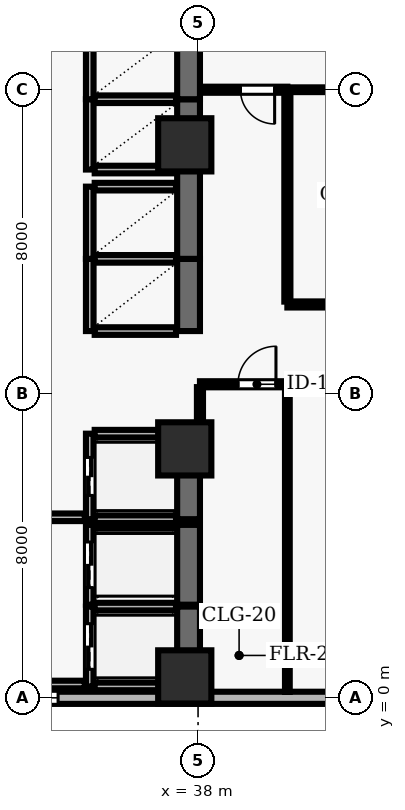
"""IFC4 building model, lengths in metres.
Left out: names, types, materials, properties, quantities, classifications, styles, units other than length and angle.
Written with IfcOpenShell. Run it as: python <this file> out.ifc"""

import sys

from ifc_helpers import new_model, si_unit, direction, frame, frame_2d, origin, origin_2d, place, context, subcontext, project, spatial, rectangle, extrude, element, fill, save


model = new_model("IFC4")
c1 = context("Model", 3, precision=1e-05, world=origin(), true_north=direction((0.0, 1.0)))
c2 = subcontext(c1, "Body", "Model", "MODEL_VIEW")
j1 = project(units=[si_unit("LENGTHUNIT", "METRE"), si_unit("PLANEANGLEUNIT", "RADIAN")], contexts=[c1])
p1 = place(None, origin())
s1 = spatial("IfcSite", under=j1, at=p1, CompositionType="ELEMENT")
p2 = place(p1, origin())
s2 = spatial("IfcBuilding", under=s1, at=p2, CompositionType="ELEMENT")
p3 = place(p2, frame((0.0, 0.0, 26.0)))
s3 = spatial("IfcBuildingStorey", under=s2, at=p3, CompositionType="ELEMENT", Elevation=26.0)
for number, where, z_axis, x_axis in (
    (1, (37.65, 0.55, 0.0), (0.0, 0.0, 1.0), (1.0, 0.0, 0.0)),
    (2, (37.65, 6.55, 0.0), (0.0, 0.0, 1.0), (1.0, 0.0, 0.0)),
    (3, (37.65, 14.55, 0.0), (0.0, 0.0, 1.0), (1.0, 0.0, 0.0)),
):
    element("IfcColumn", number, at=place(p3, frame(where, z_axis=z_axis, x_axis=x_axis)), inside=s3, PredefinedType="COLUMN", context=c2, shape_type="SweptSolid", body=[
        extrude(rectangle(XDim=1.4, YDim=1.4, at=origin_2d()), origin(), (0.0, 0.0, 1.0), 5.0),
    ])
p4 = place(p3, frame((24.5, 0.0, 0.0), z_axis=(0.0, 0.0, 1.0), x_axis=(1.0, 0.0, 0.0)))
e4 = element("IfcWall", 4, at=p4, inside=s3, PredefinedType="SOLIDWALL", context=c2, shape_type="SweptSolid", body=[
    extrude(rectangle(XDim=49.0, YDim=0.32, at=frame_2d((24.5, 0.0))), origin(), (0.0, 0.0, 1.0), 4.79),
])
p5 = place(p4, frame((1.972, 0.0, 0.9)))
e5 = element("IfcOpeningElement", 5, at=p5, cuts=e4, PredefinedType="OPENING", context=c2, shape_type="SweptSolid", body=[
    extrude(rectangle(XDim=1.5, YDim=1.8, at=frame_2d((0.75, 0.9))), frame((0.0, 0.17, 0.0), z_axis=(0.0, -1.0, 0.0), x_axis=(1.0, 0.0, 0.0)), (0.0, 0.0, 1.0), 0.34),
])
p6 = place(p4, frame((8.317, 0.0, 0.9)))
e6 = element("IfcOpeningElement", 6, at=p6, cuts=e4, PredefinedType="OPENING", context=c2, shape_type="SweptSolid", body=[
    extrude(rectangle(XDim=1.5, YDim=1.8, at=frame_2d((0.75, 0.9))), frame((0.0, 0.17, 0.0), z_axis=(0.0, -1.0, 0.0), x_axis=(1.0, 0.0, 0.0)), (0.0, 0.0, 1.0), 0.34),
])
p7 = place(p4, frame((18.306, 0.0, 0.9)))
e7 = element("IfcOpeningElement", 7, at=p7, cuts=e4, PredefinedType="OPENING", context=c2, shape_type="SweptSolid", body=[
    extrude(rectangle(XDim=1.5, YDim=1.8, at=frame_2d((0.75, 0.9))), frame((0.0, 0.17, 0.0), z_axis=(0.0, -1.0, 0.0), x_axis=(1.0, 0.0, 0.0)), (0.0, 0.0, 1.0), 0.34),
])
p8 = place(p4, frame((29.194, 0.0, 0.9)))
e8 = element("IfcOpeningElement", 8, at=p8, cuts=e4, PredefinedType="OPENING", context=c2, shape_type="SweptSolid", body=[
    extrude(rectangle(XDim=1.5, YDim=1.8, at=frame_2d((0.75, 0.9))), frame((0.0, 0.17, 0.0), z_axis=(0.0, -1.0, 0.0), x_axis=(1.0, 0.0, 0.0)), (0.0, 0.0, 1.0), 0.34),
])
p9 = place(p4, frame((34.639, 0.0, 0.9)))
e9 = element("IfcOpeningElement", 9, at=p9, cuts=e4, PredefinedType="OPENING", context=c2, shape_type="SweptSolid", body=[
    extrude(rectangle(XDim=1.5, YDim=1.8, at=frame_2d((0.75, 0.9))), frame((0.0, 0.17, 0.0), z_axis=(0.0, -1.0, 0.0), x_axis=(1.0, 0.0, 0.0)), (0.0, 0.0, 1.0), 0.34),
])
p10 = place(p4, frame((40.083, 0.0, 0.9)))
e10 = element("IfcOpeningElement", 10, at=p10, cuts=e4, PredefinedType="OPENING", context=c2, shape_type="SweptSolid", body=[
    extrude(rectangle(XDim=1.5, YDim=1.8, at=frame_2d((0.75, 0.9))), frame((0.0, 0.17, 0.0), z_axis=(0.0, -1.0, 0.0), x_axis=(1.0, 0.0, 0.0)), (0.0, 0.0, 1.0), 0.34),
])
p11 = place(p4, frame((45.528, 0.0, 0.9)))
e11 = element("IfcOpeningElement", 11, at=p11, cuts=e4, PredefinedType="OPENING", context=c2, shape_type="SweptSolid", body=[
    extrude(rectangle(XDim=1.5, YDim=1.8, at=frame_2d((0.75, 0.9))), frame((0.0, 0.17, 0.0), z_axis=(0.0, -1.0, 0.0), x_axis=(1.0, 0.0, 0.0)), (0.0, 0.0, 1.0), 0.34),
])
p12 = place(p3, frame((35.15, 2.4, 0.0), z_axis=(0.0, 0.0, 1.0), x_axis=(0.0, -1.0, 0.0)))
e12 = element("IfcWall", 12, at=p12, inside=s3, PredefinedType="SOLIDWALL", context=c2, shape_type="SweptSolid", body=[
    extrude(rectangle(XDim=2.1, YDim=0.2, at=frame_2d((1.05, 0.0))), origin(), (0.0, 0.0, 1.0), 4.79),
])
p13 = place(p12, frame((0.45, 0.0, 0.0)))
e13 = element("IfcOpeningElement", 13, at=p13, cuts=e12, PredefinedType="OPENING", context=c2, shape_type="SweptSolid", body=[
    extrude(rectangle(XDim=1.2, YDim=2.15, at=frame_2d((0.6, 1.075))), frame((0.0, 0.11, 0.0), z_axis=(0.0, -1.0, 0.0), x_axis=(1.0, 0.0, 0.0)), (0.0, 0.0, 1.0), 0.22),
])
p14 = place(p3, frame((37.75, 0.3, 0.0), z_axis=(0.0, 0.0, 1.0), x_axis=(0.0, 1.0, 0.0)))
e14 = element("IfcWall", 14, at=p14, inside=s3, PredefinedType="SHEAR", context=c2, shape_type="SweptSolid", body=[
    extrude(rectangle(XDim=2.1, YDim=0.6, at=frame_2d((1.05, 0.0))), origin(), (0.0, 0.0, 1.0), 4.79),
])
for number, where, z_axis, x_axis in (
    (15, (35.28, 0.3, 0.0), (0.0, 0.0, 1.0), (1.0, 0.0, 0.0)),
    (16, (37.42, 2.4, 0.0), (0.0, 0.0, 1.0), (-1.0, 0.0, 0.0)),
):
    element("IfcWall", number, at=place(p3, frame(where, z_axis=z_axis, x_axis=x_axis)), inside=s3, PredefinedType="SOLIDWALL", context=c2, shape_type="SweptSolid", body=[
        extrude(rectangle(XDim=2.14, YDim=0.2, at=frame_2d((1.07, 0.0))), origin(), (0.0, 0.0, 1.0), 4.79),
    ])
p15 = place(p3, frame((35.15, 4.55, 0.0), z_axis=(0.0, 0.0, 1.0), x_axis=(0.0, -1.0, 0.0)))
e17 = element("IfcWall", 17, at=p15, inside=s3, PredefinedType="SOLIDWALL", context=c2, shape_type="SweptSolid", body=[
    extrude(rectangle(XDim=2.1, YDim=0.2, at=frame_2d((1.05, 0.0))), origin(), (0.0, 0.0, 1.0), 4.79),
])
p16 = place(p15, frame((0.45, 0.0, 0.0)))
e18 = element("IfcOpeningElement", 18, at=p16, cuts=e17, PredefinedType="OPENING", context=c2, shape_type="SweptSolid", body=[
    extrude(rectangle(XDim=1.2, YDim=2.15, at=frame_2d((0.6, 1.075))), frame((0.0, 0.11, 0.0), z_axis=(0.0, -1.0, 0.0), x_axis=(1.0, 0.0, 0.0)), (0.0, 0.0, 1.0), 0.22),
])
p17 = place(p3, frame((37.75, 2.45, 0.0), z_axis=(0.0, 0.0, 1.0), x_axis=(0.0, 1.0, 0.0)))
e19 = element("IfcWall", 19, at=p17, inside=s3, PredefinedType="SHEAR", context=c2, shape_type="SweptSolid", body=[
    extrude(rectangle(XDim=2.1, YDim=0.6, at=frame_2d((1.05, 0.0))), origin(), (0.0, 0.0, 1.0), 4.79),
])
p18 = place(p3, frame((37.42, 4.55, 0.0), z_axis=(0.0, 0.0, 1.0), x_axis=(-1.0, 0.0, 0.0)))
e20 = element("IfcWall", 20, at=p18, inside=s3, PredefinedType="SOLIDWALL", context=c2, shape_type="SweptSolid", body=[
    extrude(rectangle(XDim=2.14, YDim=0.2, at=frame_2d((1.07, 0.0))), origin(), (0.0, 0.0, 1.0), 4.79),
])
p19 = place(p3, frame((35.15, 6.95, 0.0), z_axis=(0.0, 0.0, 1.0), x_axis=(0.0, -1.0, 0.0)))
e21 = element("IfcWall", 21, at=p19, inside=s3, PredefinedType="SOLIDWALL", context=c2, shape_type="SweptSolid", body=[
    extrude(rectangle(XDim=2.25, YDim=0.2, at=frame_2d((1.125, 0.0))), origin(), (0.0, 0.0, 1.0), 4.79),
])
p20 = place(p19, frame((0.625, 0.0, 0.0)))
e22 = element("IfcOpeningElement", 22, at=p20, cuts=e21, PredefinedType="OPENING", context=c2, shape_type="SweptSolid", body=[
    extrude(rectangle(XDim=1.0, YDim=2.1, at=frame_2d((0.5, 1.05))), frame((0.0, 0.11, 0.0), z_axis=(0.0, -1.0, 0.0), x_axis=(1.0, 0.0, 0.0)), (0.0, 0.0, 1.0), 0.22),
])
p21 = place(p3, frame((37.75, 4.7, 0.0), z_axis=(0.0, 0.0, 1.0), x_axis=(0.0, 1.0, 0.0)))
e23 = element("IfcWall", 23, at=p21, inside=s3, PredefinedType="SHEAR", context=c2, shape_type="SweptSolid", body=[
    extrude(rectangle(XDim=2.25, YDim=0.6, at=frame_2d((1.125, 0.0))), origin(), (0.0, 0.0, 1.0), 4.79),
])
for number, where, z_axis, x_axis in (
    (24, (35.28, 4.7, 0.0), (0.0, 0.0, 1.0), (1.0, 0.0, 0.0)),
    (25, (37.42, 6.95, 0.0), (0.0, 0.0, 1.0), (-1.0, 0.0, 0.0)),
):
    element("IfcWall", number, at=place(p3, frame(where, z_axis=z_axis, x_axis=x_axis)), inside=s3, PredefinedType="SOLIDWALL", context=c2, shape_type="SweptSolid", body=[
        extrude(rectangle(XDim=2.14, YDim=0.2, at=frame_2d((1.07, 0.0))), origin(), (0.0, 0.0, 1.0), 4.79),
    ])
p22 = place(p3, frame((35.15, 11.55, 0.0), z_axis=(0.0, 0.0, 1.0), x_axis=(0.0, -1.0, 0.0)))
e26 = element("IfcWall", 26, at=p22, inside=s3, PredefinedType="SOLIDWALL", context=c2, shape_type="SweptSolid", body=[
    extrude(rectangle(XDim=1.9, YDim=0.2, at=frame_2d((0.95, 0.0))), origin(), (0.0, 0.0, 1.0), 4.79),
])
p23 = place(p3, frame((37.75, 9.65, 0.0), z_axis=(0.0, 0.0, 1.0), x_axis=(0.0, 1.0, 0.0)))
e27 = element("IfcWall", 27, at=p23, inside=s3, PredefinedType="SHEAR", context=c2, shape_type="SweptSolid", body=[
    extrude(rectangle(XDim=1.9, YDim=0.6, at=frame_2d((0.95, 0.0))), origin(), (0.0, 0.0, 1.0), 4.79),
])
for number, where, z_axis, x_axis in (
    (28, (35.28, 9.65, 0.0), (0.0, 0.0, 1.0), (1.0, 0.0, 0.0)),
    (29, (37.42, 11.55, 0.0), (0.0, 0.0, 1.0), (-1.0, 0.0, 0.0)),
):
    element("IfcWall", number, at=place(p3, frame(where, z_axis=z_axis, x_axis=x_axis)), inside=s3, PredefinedType="SOLIDWALL", context=c2, shape_type="SweptSolid", body=[
        extrude(rectangle(XDim=2.14, YDim=0.2, at=frame_2d((1.07, 0.0))), origin(), (0.0, 0.0, 1.0), 4.79),
    ])
p24 = place(p3, frame((35.15, 13.45, 0.0), z_axis=(0.0, 0.0, 1.0), x_axis=(0.0, -1.0, 0.0)))
e30 = element("IfcWall", 30, at=p24, inside=s3, PredefinedType="SOLIDWALL", context=c2, shape_type="SweptSolid", body=[
    extrude(rectangle(XDim=1.9, YDim=0.2, at=frame_2d((0.95, 0.0))), origin(), (0.0, 0.0, 1.0), 4.79),
])
p25 = place(p3, frame((37.75, 11.55, 0.0), z_axis=(0.0, 0.0, 1.0), x_axis=(0.0, 1.0, 0.0)))
e31 = element("IfcWall", 31, at=p25, inside=s3, PredefinedType="SHEAR", context=c2, shape_type="SweptSolid", body=[
    extrude(rectangle(XDim=2.35, YDim=0.6, at=frame_2d((1.175, 0.0))), origin(), (0.0, 0.0, 1.0), 4.79),
])
p26 = place(p3, frame((37.42, 13.45, 0.0), z_axis=(0.0, 0.0, 1.0), x_axis=(-1.0, 0.0, 0.0)))
e32 = element("IfcWall", 32, at=p26, inside=s3, PredefinedType="SOLIDWALL", context=c2, shape_type="SweptSolid", body=[
    extrude(rectangle(XDim=2.14, YDim=0.2, at=frame_2d((1.07, 0.0))), origin(), (0.0, 0.0, 1.0), 4.79),
])
p27 = place(p3, frame((35.15, 15.75, 0.0), z_axis=(0.0, 0.0, 1.0), x_axis=(0.0, -1.0, 0.0)))
e33 = element("IfcWall", 33, at=p27, inside=s3, PredefinedType="SOLIDWALL", context=c2, shape_type="SweptSolid", body=[
    extrude(rectangle(XDim=1.85, YDim=0.2, at=frame_2d((0.925, 0.0))), origin(), (0.0, 0.0, 1.0), 4.79),
])
p28 = place(p3, frame((37.75, 13.9, 0.0), z_axis=(0.0, 0.0, 1.0), x_axis=(0.0, 1.0, 0.0)))
e34 = element("IfcWall", 34, at=p28, inside=s3, PredefinedType="SHEAR", context=c2, shape_type="SweptSolid", body=[
    extrude(rectangle(XDim=1.85, YDim=0.6, at=frame_2d((0.925, 0.0))), origin(), (0.0, 0.0, 1.0), 4.79),
])
for number, where, z_axis, x_axis in (
    (35, (35.28, 13.9, 0.0), (0.0, 0.0, 1.0), (1.0, 0.0, 0.0)),
    (36, (37.42, 15.75, 0.0), (0.0, 0.0, 1.0), (-1.0, 0.0, 0.0)),
):
    element("IfcWall", number, at=place(p3, frame(where, z_axis=z_axis, x_axis=x_axis)), inside=s3, PredefinedType="SOLIDWALL", context=c2, shape_type="SweptSolid", body=[
        extrude(rectangle(XDim=2.14, YDim=0.2, at=frame_2d((1.07, 0.0))), origin(), (0.0, 0.0, 1.0), 4.79),
    ])
p29 = place(p3, frame((35.15, 17.6, 0.0), z_axis=(0.0, 0.0, 1.0), x_axis=(0.0, -1.0, 0.0)))
e37 = element("IfcWall", 37, at=p29, inside=s3, PredefinedType="SOLIDWALL", context=c2, shape_type="SweptSolid", body=[
    extrude(rectangle(XDim=1.85, YDim=0.2, at=frame_2d((0.925, 0.0))), origin(), (0.0, 0.0, 1.0), 4.79),
])
p30 = place(p3, frame((37.75, 15.75, 0.0), z_axis=(0.0, 0.0, 1.0), x_axis=(0.0, 1.0, 0.0)))
e38 = element("IfcWall", 38, at=p30, inside=s3, PredefinedType="SHEAR", context=c2, shape_type="SweptSolid", body=[
    extrude(rectangle(XDim=1.85, YDim=0.6, at=frame_2d((0.925, 0.0))), origin(), (0.0, 0.0, 1.0), 4.79),
])
p31 = place(p3, frame((31.65, 0.35, 0.0), z_axis=(0.0, 0.0, 1.0), x_axis=(1.0, 0.0, 0.0)))
e39 = element("IfcWall", 39, at=p31, inside=s3, PredefinedType="SOLIDWALL", context=c2, shape_type="SweptSolid", body=[
    extrude(rectangle(XDim=3.37, YDim=0.2, at=frame_2d((1.685, 0.0))), origin(), (0.0, 0.0, 1.0), 4.79),
])
p32 = place(p3, frame((35.02, 4.75, 0.0), z_axis=(0.0, 0.0, 1.0), x_axis=(-1.0, 0.0, 0.0)))
e40 = element("IfcWall", 40, at=p32, inside=s3, PredefinedType="SOLIDWALL", context=c2, shape_type="SweptSolid", body=[
    extrude(rectangle(XDim=3.11, YDim=0.2, at=frame_2d((1.555, 0.0))), origin(), (0.0, 0.0, 1.0), 4.79),
])
p33 = place(p32, frame((1.03, 0.0, 0.0)))
e41 = element("IfcOpeningElement", 41, at=p33, cuts=e40, PredefinedType="OPENING", context=c2, shape_type="SweptSolid", body=[
    extrude(rectangle(XDim=1.05, YDim=2.15, at=frame_2d((0.525, 1.075))), frame((0.0, 0.11, 0.0), z_axis=(0.0, -1.0, 0.0), x_axis=(1.0, 0.0, 0.0)), (0.0, 0.0, 1.0), 0.22),
])
p34 = place(p3, frame((38.05, 8.25, 0.0), z_axis=(0.0, 0.0, 1.0), x_axis=(1.0, 0.0, 0.0)))
e42 = element("IfcWall", 42, at=p34, inside=s3, PredefinedType="PARTITIONING", context=c2, shape_type="SweptSolid", body=[
    extrude(rectangle(XDim=2.3, YDim=0.16, at=frame_2d((1.15, 0.0))), origin(), (0.0, 0.0, 1.0), 4.155),
])
p35 = place(p34, frame((1.0, 0.0, 0.0)))
e43 = element("IfcOpeningElement", 43, at=p35, cuts=e42, PredefinedType="OPENING", context=c2, shape_type="SweptSolid", body=[
    extrude(rectangle(XDim=1.0, YDim=2.1, at=frame_2d((0.5, 1.05))), frame((0.0, 0.09, 0.0), z_axis=(0.0, -1.0, 0.0), x_axis=(1.0, 0.0, 0.0)), (0.0, 0.0, 1.0), 0.18),
])
p36 = place(p3, frame((40.35, 8.25, 0.0), z_axis=(0.0, 0.0, 1.0), x_axis=(1.0, 0.0, 0.0)))
e44 = element("IfcWall", 44, at=p36, inside=s3, PredefinedType="PARTITIONING", context=c2, shape_type="SweptSolid", body=[
    extrude(rectangle(XDim=8.56, YDim=0.16, at=frame_2d((4.28, 0.0))), origin(), (0.0, 0.0, 1.0), 4.155),
])
p37 = place(p36, frame((3.13, 0.0, 0.0)))
e45 = element("IfcOpeningElement", 45, at=p37, cuts=e44, PredefinedType="OPENING", context=c2, shape_type="SweptSolid", body=[
    extrude(rectangle(XDim=0.9, YDim=2.1, at=frame_2d((0.45, 1.05))), frame((0.0, 0.09, 0.0), z_axis=(0.0, -1.0, 0.0), x_axis=(1.0, 0.0, 0.0)), (0.0, 0.0, 1.0), 0.18),
])
p38 = place(p3, frame((40.35, 16.0, 0.0), z_axis=(0.0, 0.0, 1.0), x_axis=(-1.0, 0.0, 0.0)))
e46 = element("IfcWall", 46, at=p38, inside=s3, PredefinedType="PARTITIONING", context=c2, shape_type="SweptSolid", body=[
    extrude(rectangle(XDim=2.27, YDim=0.16, at=frame_2d((1.135, 0.0))), origin(), (0.0, 0.0, 1.0), 4.79),
])
p39 = place(p38, frame((0.335, 0.0, 0.0)))
e47 = element("IfcOpeningElement", 47, at=p39, cuts=e46, PredefinedType="OPENING", context=c2, shape_type="SweptSolid", body=[
    extrude(rectangle(XDim=0.9, YDim=2.1, at=frame_2d((0.45, 1.05))), frame((0.0, 0.09, 0.0), z_axis=(0.0, -1.0, 0.0), x_axis=(1.0, 0.0, 0.0)), (0.0, 0.0, 1.0), 0.18),
])
p40 = place(p3, frame((48.91, 10.35, 0.0), z_axis=(0.0, 0.0, 1.0), x_axis=(-1.0, 0.0, 0.0)))
e48 = element("IfcWall", 48, at=p40, inside=s3, PredefinedType="PARTITIONING", context=c2, shape_type="SweptSolid", body=[
    extrude(rectangle(XDim=8.56, YDim=0.16, at=frame_2d((4.28, 0.0))), origin(), (0.0, 0.0, 1.0), 4.377),
])
p41 = place(p40, frame((3.78, 0.0, 0.0)))
e49 = element("IfcOpeningElement", 49, at=p41, cuts=e48, PredefinedType="OPENING", context=c2, shape_type="SweptSolid", body=[
    extrude(rectangle(XDim=1.0, YDim=2.1, at=frame_2d((0.5, 1.05))), frame((0.0, 0.09, 0.0), z_axis=(0.0, -1.0, 0.0), x_axis=(1.0, 0.0, 0.0)), (0.0, 0.0, 1.0), 0.18),
])
p42 = place(p3, frame((48.91, 16.0, 0.0), z_axis=(0.0, 0.0, 1.0), x_axis=(-1.0, 0.0, 0.0)))
e50 = element("IfcWall", 50, at=p42, inside=s3, PredefinedType="PARTITIONING", context=c2, shape_type="SweptSolid", body=[
    extrude(rectangle(XDim=8.56, YDim=0.125, at=frame_2d((4.28, 0.0))), origin(), (0.0, 0.0, 1.0), 4.79),
])
p43 = place(p3, frame((38.05, 7.05, 0.0), z_axis=(0.0, 0.0, 1.0), x_axis=(0.0, 1.0, 0.0)))
e51 = element("IfcWall", 51, at=p43, inside=s3, PredefinedType="PARTITIONING", context=c2, shape_type="SweptSolid", body=[
    extrude(rectangle(XDim=1.125, YDim=0.16, at=frame_2d((0.562, 0.0))), origin(), (0.0, 0.0, 1.0), 4.155),
])
p44 = place(p3, frame((40.35, 0.155, 0.0), z_axis=(0.0, 0.0, 1.0), x_axis=(0.0, 1.0, 0.0)))
e52 = element("IfcWall", 52, at=p44, inside=s3, PredefinedType="PARTITIONING", context=c2, shape_type="SweptSolid", body=[
    extrude(rectangle(XDim=8.02, YDim=0.125, at=frame_2d((4.01, 0.0))), origin(), (0.0, 0.0, 1.0), 4.79),
])
p45 = place(p3, frame((40.35, 10.425, 0.0), z_axis=(0.0, 0.0, 1.0), x_axis=(0.0, 1.0, 0.0)))
e53 = element("IfcWall", 53, at=p45, inside=s3, PredefinedType="PARTITIONING", context=c2, shape_type="SweptSolid", body=[
    extrude(rectangle(XDim=5.5, YDim=0.16, at=frame_2d((2.75, 0.0))), origin(), (0.0, 0.0, 1.0), 4.377),
])
p46 = place(p6, origin())
e54 = element("IfcWindow", 54, at=p46, inside=s3, PartitioningType="SINGLE_PANEL", PredefinedType="WINDOW", context=c2, shape_type="SweptSolid", body=[
    extrude(rectangle(XDim=1.5, YDim=1.8, at=frame_2d((0.75, 0.9))), frame((0.0, 0.03, 0.0), z_axis=(0.0, -1.0, 0.0), x_axis=(1.0, 0.0, 0.0)), (0.0, 0.0, 1.0), 0.06),
])
fill(e6, e54)
p47 = place(p13, origin())
e55 = element("IfcDoor", 55, at=p47, inside=s3, OperationType="DOUBLE_DOOR_SLIDING", PredefinedType="DOOR", context=c2, shape_type="SweptSolid", body=[
    extrude(rectangle(XDim=1.2, YDim=2.15, at=frame_2d((0.6, 1.075))), frame((0.0, 0.025, 0.0), z_axis=(0.0, -1.0, 0.0), x_axis=(1.0, 0.0, 0.0)), (0.0, 0.0, 1.0), 0.05),
])
fill(e13, e55)
p48 = place(p16, origin())
e56 = element("IfcDoor", 56, at=p48, inside=s3, OperationType="DOUBLE_DOOR_SLIDING", PredefinedType="DOOR", context=c2, shape_type="SweptSolid", body=[
    extrude(rectangle(XDim=1.2, YDim=2.15, at=frame_2d((0.6, 1.075))), frame((0.0, 0.025, 0.0), z_axis=(0.0, -1.0, 0.0), x_axis=(1.0, 0.0, 0.0)), (0.0, 0.0, 1.0), 0.05),
])
fill(e18, e56)
p49 = place(p20, origin())
e57 = element("IfcDoor", 57, at=p49, inside=s3, OperationType="DOUBLE_DOOR_SLIDING", PredefinedType="DOOR", context=c2, shape_type="SweptSolid", body=[
    extrude(rectangle(XDim=1.0, YDim=2.1, at=frame_2d((0.5, 1.05))), frame((0.0, 0.025, 0.0), z_axis=(0.0, -1.0, 0.0), x_axis=(1.0, 0.0, 0.0)), (0.0, 0.0, 1.0), 0.05),
])
fill(e22, e57)
p50 = place(p35, origin())
e58 = element("IfcDoor", 58, at=p50, inside=s3, OperationType="SINGLE_SWING_RIGHT", PredefinedType="DOOR", context=c2, shape_type="SweptSolid", body=[
    extrude(rectangle(XDim=1.0, YDim=2.1, at=frame_2d((0.5, 1.05))), frame((0.0, 0.025, 0.0), z_axis=(0.0, -1.0, 0.0), x_axis=(1.0, 0.0, 0.0)), (0.0, 0.0, 1.0), 0.05),
])
fill(e43, e58)
p51 = place(p39, origin())
e59 = element("IfcDoor", 59, at=p51, inside=s3, OperationType="SINGLE_SWING_LEFT", PredefinedType="DOOR", context=c2, shape_type="SweptSolid", body=[
    extrude(rectangle(XDim=0.9, YDim=2.1, at=frame_2d((0.45, 1.05))), frame((0.0, 0.025, 0.0), z_axis=(0.0, -1.0, 0.0), x_axis=(1.0, 0.0, 0.0)), (0.0, 0.0, 1.0), 0.05),
])
fill(e47, e59)
save(model, sys.argv[1])
